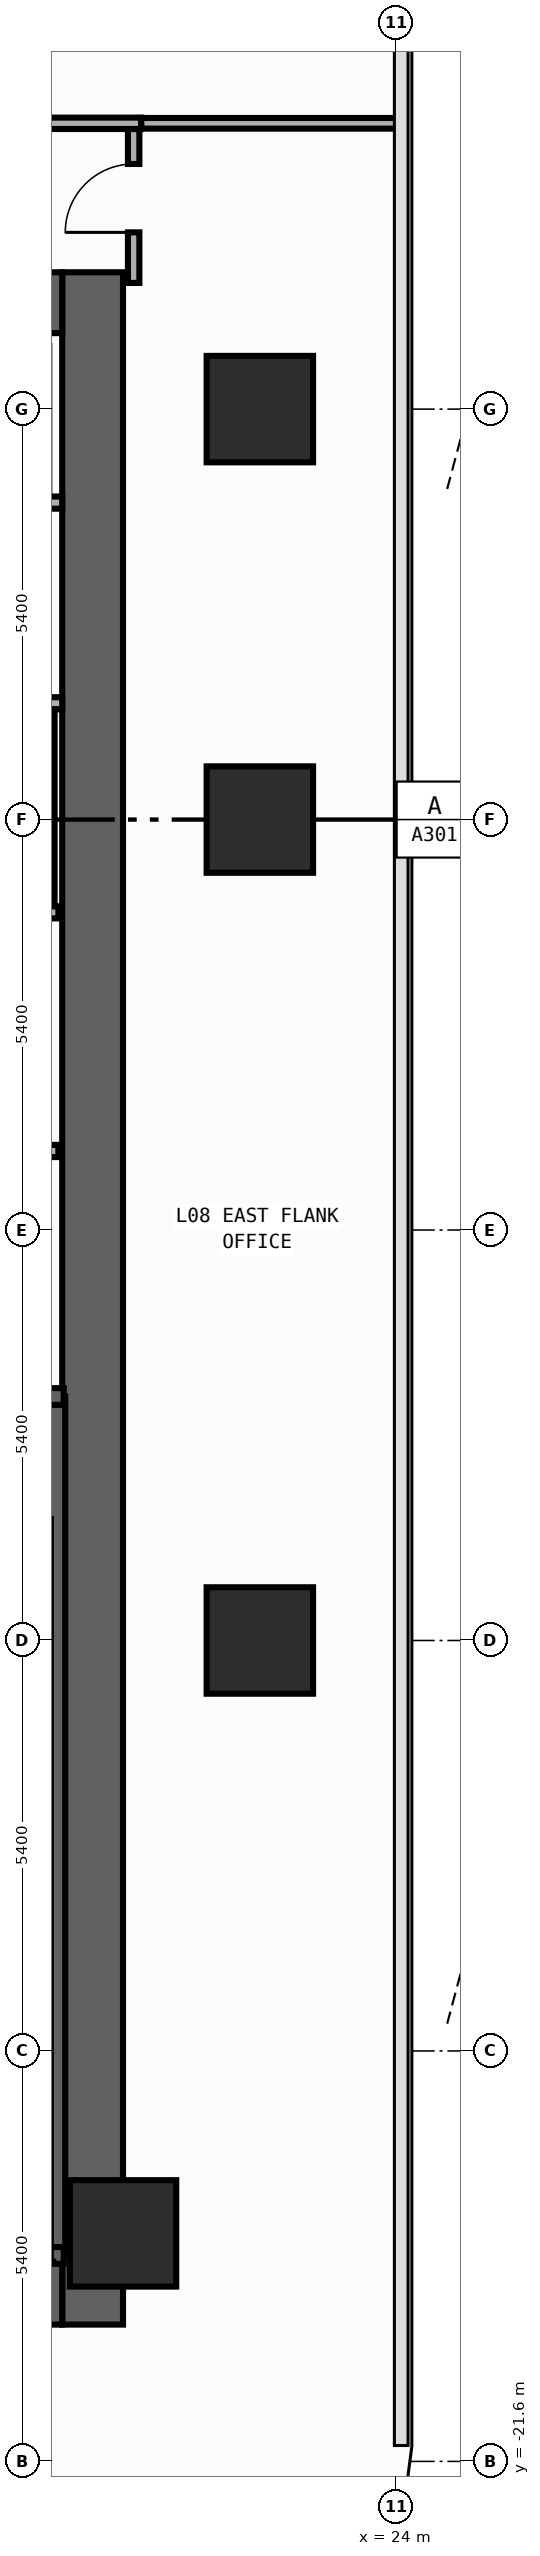
"""IFC4 building model, lengths in metres.
Left out: names, types, materials, properties, quantities, classifications, styles, units other than length and angle.
Written with IfcOpenShell. Run it as: python <this file> out.ifc"""

import sys

from ifc_helpers import new_model, si_unit, direction, frame, frame_2d, origin, origin_2d, place, context, subcontext, project, spatial, rectangle, extrude, element, fill, save


model = new_model("IFC4")
c1 = context("Model", 3, precision=1e-05, world=origin(), true_north=direction((0.0, 1.0)))
c2 = subcontext(c1, "Body", "Model", "MODEL_VIEW")
j1 = project(units=[si_unit("LENGTHUNIT", "METRE"), si_unit("PLANEANGLEUNIT", "RADIAN")], contexts=[c1])
p1 = place(None, origin())
s1 = spatial("IfcSite", under=j1, at=p1, CompositionType="ELEMENT")
p2 = place(p1, origin())
s2 = spatial("IfcBuilding", under=s1, at=p2, CompositionType="ELEMENT")
p3 = place(p2, frame((0.0, 0.0, 34.4)))
s3 = spatial("IfcBuildingStorey", under=s2, at=p3, CompositionType="ELEMENT", Elevation=34.4)
p4 = place(p3, frame((20.0, -19.8, 0.0), z_axis=(0.0, 0.0, 1.0), x_axis=(0.0, 1.0, 0.0)))
e1 = element("IfcWall", 1, at=p4, inside=s3, PredefinedType="SHEAR", context=c2, shape_type="SweptSolid", body=[
    extrude(rectangle(XDim=27.0, YDim=0.8, at=frame_2d((13.5, 0.0))), origin(), (0.0, 0.0, 1.0), 3.94),
])
for number, where, z_axis, x_axis in (
    (2, (12.8, -19.4, 0.0), (0.0, 0.0, 1.0), (1.0, 0.0, 0.0)),
    (3, (12.8, 6.8, 0.0), (0.0, 0.0, 1.0), (1.0, 0.0, 0.0)),
):
    element("IfcWall", number, at=place(p3, frame(where, z_axis=z_axis, x_axis=x_axis)), inside=s3, PredefinedType="SHEAR", context=c2, shape_type="SweptSolid", body=[
        extrude(rectangle(XDim=6.8, YDim=0.8, at=frame_2d((3.4, 0.0))), origin(), (0.0, 0.0, 1.0), 3.94),
    ])
p5 = place(p3, frame((19.53, -18.89, 0.0), z_axis=(0.0, 0.0, 1.0), x_axis=(0.0, 1.0, 0.0)))
e4 = element("IfcWall", 4, at=p5, inside=s3, PredefinedType="SHEAR", context=c2, shape_type="SweptSolid", body=[
    extrude(rectangle(XDim=11.3, YDim=0.22, at=frame_2d((5.65, 0.0))), origin(), (0.0, 0.0, 1.0), 3.94),
])
p6 = place(p3, frame((15.705, -18.89, 0.0), z_axis=(0.0, 0.0, 1.0), x_axis=(1.0, 0.0, 0.0)))
e5 = element("IfcWall", 5, at=p6, inside=s3, PredefinedType="SHEAR", context=c2, shape_type="SweptSolid", body=[
    extrude(rectangle(XDim=3.915, YDim=0.22, at=frame_2d((1.958, 0.0))), origin(), (0.0, 0.0, 1.0), 3.94),
])
p7 = place(p3, frame((19.62, -7.59, 0.0), z_axis=(0.0, 0.0, 1.0), x_axis=(-1.0, 0.0, 0.0)))
e6 = element("IfcWall", 6, at=p7, inside=s3, PredefinedType="SHEAR", context=c2, shape_type="SweptSolid", body=[
    extrude(rectangle(XDim=3.915, YDim=0.22, at=frame_2d((1.958, 0.0))), origin(), (0.0, 0.0, 1.0), 3.94),
])
p8 = place(p7, frame((1.08, 0.0, 0.0)))
e7 = element("IfcOpeningElement", 7, at=p8, cuts=e6, PredefinedType="OPENING", context=c2, shape_type="SweptSolid", body=[
    extrude(rectangle(XDim=1.1, YDim=2.2, at=frame_2d((0.55, 1.1))), frame((0.0, 0.12, 0.0), z_axis=(0.0, -1.0, 0.0), x_axis=(1.0, 0.0, 0.0)), (0.0, 0.0, 1.0), 0.24),
])
for number, where, z_axis, x_axis in (
    (8, (20.4, -18.6, 0.0), (0.0, 0.0, 1.0), (1.0, 0.0, 0.0)),
    (9, (22.2, -10.8, 0.0), (0.0, 0.0, 1.0), (1.0, 0.0, 0.0)),
    (10, (22.2, 0.0, 0.0), (0.0, 0.0, 1.0), (1.0, 0.0, 0.0)),
    (11, (22.2, 5.4, 0.0), (0.0, 0.0, 1.0), (1.0, 0.0, 0.0)),
):
    element("IfcColumn", number, at=place(p3, frame(where, z_axis=z_axis, x_axis=x_axis)), inside=s3, PredefinedType="COLUMN", context=c2, shape_type="SweptSolid", body=[
        extrude(rectangle(XDim=1.4, YDim=1.4, at=origin_2d()), origin(), (0.0, 0.0, 1.0), 4.2),
    ])
p9 = place(p3, frame((15.75, -4.36, 0.0), z_axis=(0.0, 0.0, 1.0), x_axis=(1.0, 0.0, 0.0)))
e12 = element("IfcWall", 12, at=p9, inside=s3, PredefinedType="STANDARD", context=c2, shape_type="SweptSolid", body=[
    extrude(rectangle(XDim=3.8, YDim=0.16, at=frame_2d((1.9, 0.0))), origin(), (0.0, 0.0, 1.0), 3.94),
])
p10 = place(p9, frame((1.47, 0.0, 0.0)))
e13 = element("IfcOpeningElement", 13, at=p10, cuts=e12, PredefinedType="OPENING", context=c2, shape_type="SweptSolid", body=[
    extrude(rectangle(XDim=1.15, YDim=2.2, at=frame_2d((0.575, 1.1))), frame((0.0, 0.09, 0.0), z_axis=(0.0, -1.0, 0.0), x_axis=(1.0, 0.0, 0.0)), (0.0, 0.0, 1.0), 0.18),
])
p11 = place(p3, frame((15.75, -1.22, 0.0), z_axis=(0.0, 0.0, 1.0), x_axis=(1.0, 0.0, 0.0)))
e14 = element("IfcWall", 14, at=p11, inside=s3, PredefinedType="STANDARD", context=c2, shape_type="SweptSolid", body=[
    extrude(rectangle(XDim=3.8, YDim=0.16, at=frame_2d((1.9, 0.0))), origin(), (0.0, 0.0, 1.0), 3.94),
])
for number, where, z_axis, x_axis in (
    (15, (17.31, 4.17, 0.0), (0.0, 0.0, 1.0), (1.0, 0.0, 0.0)),
    (16, (17.31, 1.53, 0.0), (0.0, 0.0, 1.0), (1.0, 0.0, 0.0)),
):
    element("IfcWall", number, at=place(p3, frame(where, z_axis=z_axis, x_axis=x_axis)), inside=s3, PredefinedType="PARTITIONING", context=c2, shape_type="SweptSolid", body=[
        extrude(rectangle(XDim=2.29, YDim=0.16, at=frame_2d((1.145, 0.0))), origin(), (0.0, 0.0, 1.0), 3.94),
    ])
p12 = place(p3, frame((20.54, 7.06, 0.0), z_axis=(0.0, 0.0, 1.0), x_axis=(0.0, 1.0, 0.0)))
e17 = element("IfcWall", 17, at=p12, inside=s3, PredefinedType="PARTITIONING", context=c2, shape_type="SweptSolid", body=[
    extrude(rectangle(XDim=2.025, YDim=0.15, at=frame_2d((1.012, 0.0))), origin(), (0.0, 0.0, 1.0), 3.94),
])
p13 = place(p12, frame((0.665, 0.0, 0.0)))
e18 = element("IfcOpeningElement", 18, at=p13, cuts=e17, PredefinedType="OPENING", context=c2, shape_type="SweptSolid", body=[
    extrude(rectangle(XDim=0.9, YDim=2.15, at=frame_2d((0.45, 1.075))), frame((0.0, 0.085, 0.0), z_axis=(0.0, -1.0, 0.0), x_axis=(1.0, 0.0, 0.0)), (0.0, 0.0, 1.0), 0.17),
])
p14 = place(p3, frame((11.81, 9.16, 0.0), z_axis=(0.0, 0.0, 1.0), x_axis=(1.0, 0.0, 0.0)))
e19 = element("IfcWall", 19, at=p14, inside=s3, PredefinedType="PARTITIONING", context=c2, shape_type="SweptSolid", body=[
    extrude(rectangle(XDim=8.83, YDim=0.15, at=frame_2d((4.415, 0.0))), origin(), (0.0, 0.0, 1.0), 3.94),
])
p15 = place(p14, frame((5.067, 0.0, 0.0)))
e20 = element("IfcOpeningElement", 20, at=p15, cuts=e19, PredefinedType="OPENING", context=c2, shape_type="SweptSolid", body=[
    extrude(rectangle(XDim=0.9, YDim=2.15, at=frame_2d((0.45, 1.075))), frame((0.0, 0.085, 0.0), z_axis=(0.0, -1.0, 0.0), x_axis=(1.0, 0.0, 0.0)), (0.0, 0.0, 1.0), 0.17),
])
p16 = place(p3, frame((20.64, 9.16, 0.0), z_axis=(0.0, 0.0, 1.0), x_axis=(1.0, 0.0, 0.0)))
e21 = element("IfcWall", 21, at=p16, inside=s3, PredefinedType="PARTITIONING", context=c2, shape_type="SweptSolid", body=[
    extrude(rectangle(XDim=3.415, YDim=0.14, at=frame_2d((1.708, 0.0))), origin(), (0.0, 0.0, 1.0), 3.94),
])
p17 = place(p3, frame((19.45, 1.45, 0.0), z_axis=(0.0, 0.0, 1.0), x_axis=(0.0, -1.0, 0.0)))
e22 = element("IfcWall", 22, at=p17, inside=s3, PredefinedType="PARTITIONING", context=c2, shape_type="SweptSolid", body=[
    extrude(rectangle(XDim=2.59, YDim=0.1, at=frame_2d((1.295, 0.0))), origin(), (0.0, 0.0, 1.0), 3.94),
])
p18 = place(p13, origin())
e23 = element("IfcDoor", 23, at=p18, inside=s3, OperationType="SINGLE_SWING_LEFT", PredefinedType="DOOR", context=c2, shape_type="SweptSolid", body=[
    extrude(rectangle(XDim=0.9, YDim=2.15, at=frame_2d((0.45, 1.075))), frame((0.0, 0.025, 0.0), z_axis=(0.0, -1.0, 0.0), x_axis=(1.0, 0.0, 0.0)), (0.0, 0.0, 1.0), 0.05),
])
fill(e18, e23)
save(model, sys.argv[1])
